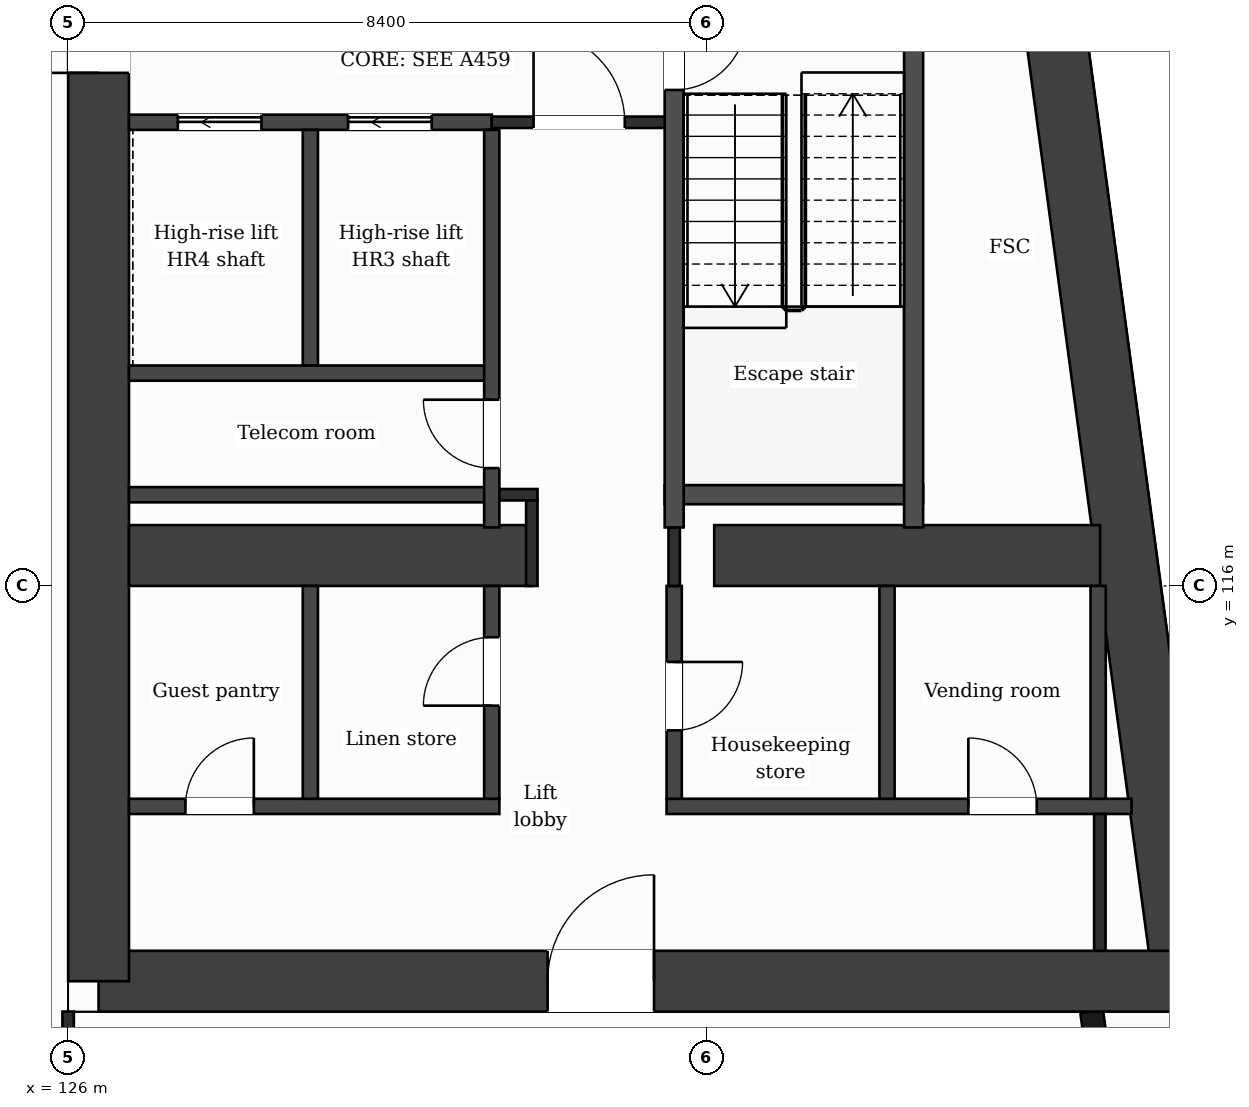
"""IFC4 building model, lengths in metres.
Left out: names, types, materials, properties, quantities, classifications, styles, units other than length and angle.
Written with IfcOpenShell. Run it as: python <this file> out.ifc"""

import sys

from ifc_helpers import new_model, si_unit, direction, frame, frame_2d, origin, place, context, subcontext, project, spatial, rectangle, extrude, element, fill, save


model = new_model("IFC4")
c1 = context("Model", 3, precision=1e-05, world=origin(), true_north=direction((0.0, 1.0)))
c2 = subcontext(c1, "Body", "Model", "MODEL_VIEW")
j1 = project(units=[si_unit("LENGTHUNIT", "METRE"), si_unit("PLANEANGLEUNIT", "RADIAN")], contexts=[c1])
p1 = place(None, origin())
s1 = spatial("IfcSite", under=j1, at=p1, CompositionType="ELEMENT")
p2 = place(p1, origin())
s2 = spatial("IfcBuilding", under=s1, at=p2, CompositionType="ELEMENT")
p3 = place(p2, frame((0.0, 0.0, 239.2)))
s3 = spatial("IfcBuildingStorey", under=s2, at=p3, CompositionType="ELEMENT", Elevation=239.2)
p4 = place(p3, frame((137.82, 132.0, 0.0), z_axis=(0.0, 0.0, 1.0), x_axis=(0.133408347329, -0.991061154956, 0.0)))
e1 = element("IfcWall", 1, at=p4, inside=s3, PredefinedType="SHEAR", context=c2, shape_type="SweptSolid", body=[
    extrude(rectangle(XDim=21.391, YDim=0.8, at=frame_2d((10.696, 0.0))), origin(), (0.0, 0.0, 1.0), 3.7),
])
p5 = place(p3, frame((140.673, 110.8, 0.0), z_axis=(0.0, 0.0, 1.0), x_axis=(-1.0, 0.0, 0.0)))
e2 = element("IfcWall", 2, at=p5, inside=s3, PredefinedType="SHEAR", context=c2, shape_type="SweptSolid", body=[
    extrude(rectangle(XDim=14.273, YDim=0.8, at=frame_2d((7.137, 0.0))), origin(), (0.0, 0.0, 1.0), 3.7),
])
p6 = place(p5, frame((6.965, 0.0, 0.0)))
e3 = element("IfcOpeningElement", 3, at=p6, cuts=e2, PredefinedType="OPENING", context=c2, shape_type="SweptSolid", body=[
    extrude(rectangle(XDim=1.4, YDim=2.1, at=frame_2d((0.7, 1.05))), frame((0.0, 0.41, 0.0), z_axis=(0.0, -1.0, 0.0), x_axis=(1.0, 0.0, 0.0)), (0.0, 0.0, 1.0), 0.82),
])
p7 = place(p3, frame((126.4, 110.8, 0.0), z_axis=(0.0, 0.0, 1.0), x_axis=(0.0, 1.0, 0.0)))
e4 = element("IfcWall", 4, at=p7, inside=s3, PredefinedType="SHEAR", context=c2, shape_type="SweptSolid", body=[
    extrude(rectangle(XDim=21.2, YDim=0.8, at=frame_2d((10.6, 0.0))), origin(), (0.0, 0.0, 1.0), 3.7),
])
p8 = place(p7, frame((11.95, 0.0, 0.0)))
e5 = element("IfcOpeningElement", 5, at=p8, cuts=e4, PredefinedType="OPENING", context=c2, shape_type="SweptSolid", body=[
    extrude(rectangle(XDim=1.4, YDim=2.1, at=frame_2d((0.7, 1.05))), frame((0.0, 0.41, 0.0), z_axis=(0.0, -1.0, 0.0), x_axis=(1.0, 0.0, 0.0)), (0.0, 0.0, 1.0), 0.82),
])
p9 = place(p3, frame((126.8, 116.4, 0.0), z_axis=(0.0, 0.0, 1.0), x_axis=(1.0, 0.0, 0.0)))
e6 = element("IfcWall", 6, at=p9, inside=s3, PredefinedType="SHEAR", context=c2, shape_type="SweptSolid", body=[
    extrude(rectangle(XDim=5.3, YDim=0.8, at=frame_2d((2.65, 0.0))), origin(), (0.0, 0.0, 1.0), 3.7),
])
p10 = place(p3, frame((134.5, 116.4, 0.0), z_axis=(0.0, 0.0, 1.0), x_axis=(1.0, 0.0, 0.0)))
e7 = element("IfcWall", 7, at=p10, inside=s3, PredefinedType="SHEAR", context=c2, shape_type="SweptSolid", body=[
    extrude(rectangle(XDim=5.077, YDim=0.8, at=frame_2d((2.539, 0.0))), origin(), (0.0, 0.0, 1.0), 3.7),
])
p11 = place(p3, frame((140.348, 103.85, 0.0), z_axis=(0.0, 0.0, 1.0), x_axis=(-0.133431549479, 0.991058031401, 0.0)))
e8 = element("IfcWall", 8, at=p11, inside=s3, PredefinedType="SOLIDWALL", context=c2, shape_type="SweptSolid", body=[
    extrude(rectangle(XDim=6.609, YDim=0.3, at=frame_2d((3.304, 0.0))), origin(), (0.0, 0.0, 1.0), 3.38),
])
p12 = place(p11, frame((0.737, 0.0, 0.9)))
e9 = element("IfcOpeningElement", 9, at=p12, cuts=e8, PredefinedType="OPENING", context=c2, shape_type="SweptSolid", body=[
    extrude(rectangle(XDim=1.2, YDim=2.1, at=frame_2d((0.6, 1.05))), frame((0.0, 0.16, 0.0), z_axis=(0.0, -1.0, 0.0), x_axis=(1.0, 0.0, 0.0)), (0.0, 0.0, 1.0), 0.32),
])
p13 = place(p11, frame((3.991, 0.0, 0.0)))
e10 = element("IfcOpeningElement", 10, at=p13, cuts=e8, PredefinedType="OPENING", context=c2, shape_type="SweptSolid", body=[
    extrude(rectangle(XDim=1.2, YDim=2.4, at=frame_2d((0.6, 1.2))), frame((0.0, 0.16, 0.0), z_axis=(0.0, -1.0, 0.0), x_axis=(1.0, 0.0, 0.0)), (0.0, 0.0, 1.0), 0.32),
])
p14 = place(p3, frame((126.8, 113.1, 0.0), z_axis=(0.0, 0.0, 1.0), x_axis=(1.0, 0.0, 0.0)))
e11 = element("IfcWall", 11, at=p14, inside=s3, PredefinedType="PARTITIONING", context=c2, shape_type="SweptSolid", body=[
    extrude(rectangle(XDim=4.873, YDim=0.2, at=frame_2d((2.437, 0.0))), origin(), (0.0, 0.0, 1.0), 3.38),
])
p15 = place(p14, frame((0.743, 0.0, 0.0)))
e12 = element("IfcOpeningElement", 12, at=p15, cuts=e11, PredefinedType="OPENING", context=c2, shape_type="SweptSolid", body=[
    extrude(rectangle(XDim=0.9, YDim=2.1, at=frame_2d((0.45, 1.05))), frame((0.0, 0.11, 0.0), z_axis=(0.0, -1.0, 0.0), x_axis=(1.0, 0.0, 0.0)), (0.0, 0.0, 1.0), 0.22),
])
p16 = place(p3, frame((133.873, 113.1, 0.0), z_axis=(0.0, 0.0, 1.0), x_axis=(1.0, 0.0, 0.0)))
e13 = element("IfcWall", 13, at=p16, inside=s3, PredefinedType="PARTITIONING", context=c2, shape_type="SweptSolid", body=[
    extrude(rectangle(XDim=6.117, YDim=0.2, at=frame_2d((3.059, 0.0))), origin(), (0.0, 0.0, 1.0), 3.38),
])
p17 = place(p16, frame((3.97, 0.0, 0.0)))
e14 = element("IfcOpeningElement", 14, at=p17, cuts=e13, PredefinedType="OPENING", context=c2, shape_type="SweptSolid", body=[
    extrude(rectangle(XDim=0.9, YDim=2.1, at=frame_2d((0.45, 1.05))), frame((0.0, 0.11, 0.0), z_axis=(0.0, -1.0, 0.0), x_axis=(1.0, 0.0, 0.0)), (0.0, 0.0, 1.0), 0.22),
])
p18 = place(p3, frame((126.8, 117.2, 0.0), z_axis=(0.0, 0.0, 1.0), x_axis=(1.0, 0.0, 0.0)))
e15 = element("IfcWall", 15, at=p18, inside=s3, PredefinedType="PARTITIONING", context=c2, shape_type="SweptSolid", body=[
    extrude(rectangle(XDim=4.773, YDim=0.2, at=frame_2d((2.386, 0.0))), origin(), (0.0, 0.0, 1.0), 3.38),
])
p19 = place(p3, frame((131.573, 117.2, 0.0), z_axis=(0.0, 0.0, 1.0), x_axis=(1.0, 0.0, 0.0)))
e16 = element("IfcWall", 16, at=p19, inside=s3, PredefinedType="PARTITIONING", context=c2, shape_type="SweptSolid", body=[
    extrude(rectangle(XDim=0.602, YDim=0.15, at=frame_2d((0.301, 0.0))), origin(), (0.0, 0.0, 1.0), 3.38),
])
p20 = place(p3, frame((133.848, 117.2, 0.0), z_axis=(0.0, 0.0, 1.0), x_axis=(1.0, 0.0, 0.0)))
e17 = element("IfcWall", 17, at=p20, inside=s3, PredefinedType="PARTITIONING", context=c2, shape_type="SweptSolid", body=[
    extrude(rectangle(XDim=3.4, YDim=0.25, at=frame_2d((1.7, 0.0))), origin(), (0.0, 0.0, 1.0), 3.38),
])
p21 = place(p3, frame((126.8, 118.8, 0.0), z_axis=(0.0, 0.0, 1.0), x_axis=(1.0, 0.0, 0.0)))
e18 = element("IfcWall", 18, at=p21, inside=s3, PredefinedType="PARTITIONING", context=c2, shape_type="SweptSolid", body=[
    extrude(rectangle(XDim=4.773, YDim=0.2, at=frame_2d((2.386, 0.0))), origin(), (0.0, 0.0, 1.0), 3.38),
])
p22 = place(p3, frame((126.8, 122.1, 0.0), z_axis=(0.0, 0.0, 1.0), x_axis=(1.0, 0.0, 0.0)))
e19 = element("IfcWall", 19, at=p22, inside=s3, PredefinedType="PARTITIONING", context=c2, shape_type="SweptSolid", body=[
    extrude(rectangle(XDim=4.773, YDim=0.2, at=frame_2d((2.386, 0.0))), origin(), (0.0, 0.0, 1.0), 3.38),
])
p23 = place(p22, frame((2.883, 0.0, 0.0)))
e20 = element("IfcOpeningElement", 20, at=p23, cuts=e19, PredefinedType="OPENING", context=c2, shape_type="SweptSolid", body=[
    extrude(rectangle(XDim=1.1, YDim=2.1, at=frame_2d((0.55, 1.05))), frame((0.0, 0.11, 0.0), z_axis=(0.0, -1.0, 0.0), x_axis=(1.0, 0.0, 0.0)), (0.0, 0.0, 1.0), 0.22),
])
p24 = place(p22, frame((0.643, 0.0, 0.0)))
e21 = element("IfcOpeningElement", 21, at=p24, cuts=e19, PredefinedType="OPENING", context=c2, shape_type="SweptSolid", body=[
    extrude(rectangle(XDim=1.1, YDim=2.1, at=frame_2d((0.55, 1.05))), frame((0.0, 0.11, 0.0), z_axis=(0.0, -1.0, 0.0), x_axis=(1.0, 0.0, 0.0)), (0.0, 0.0, 1.0), 0.22),
])
p25 = place(p3, frame((131.573, 122.1, 0.0), z_axis=(0.0, 0.0, 1.0), x_axis=(1.0, 0.0, 0.0)))
e22 = element("IfcWall", 22, at=p25, inside=s3, PredefinedType="PARTITIONING", context=c2, shape_type="SweptSolid", body=[
    extrude(rectangle(XDim=2.4, YDim=0.15, at=frame_2d((1.2, 0.0))), origin(), (0.0, 0.0, 1.0), 3.38),
])
p26 = place(p25, frame((0.55, 0.0, 0.0)))
e23 = element("IfcOpeningElement", 23, at=p26, cuts=e22, PredefinedType="OPENING", context=c2, shape_type="SweptSolid", body=[
    extrude(rectangle(XDim=1.2, YDim=2.1, at=frame_2d((0.6, 1.05))), frame((0.0, 0.085, 0.0), z_axis=(0.0, -1.0, 0.0), x_axis=(1.0, 0.0, 0.0)), (0.0, 0.0, 1.0), 0.17),
])
p27 = place(p3, frame((126.0, 109.075, 0.0), z_axis=(0.0, 0.0, 1.0), x_axis=(0.0, 1.0, 0.0)))
e24 = element("IfcWall", 24, at=p27, inside=s3, PredefinedType="PARTITIONING", context=c2, shape_type="SweptSolid", body=[
    extrude(rectangle(XDim=1.325, YDim=0.15, at=frame_2d((0.663, 0.0))), origin(), (0.0, 0.0, 1.0), 3.38),
])
p28 = place(p3, frame((129.187, 113.2, 0.0), z_axis=(0.0, 0.0, 1.0), x_axis=(0.0, 1.0, 0.0)))
e25 = element("IfcWall", 25, at=p28, inside=s3, PredefinedType="PARTITIONING", context=c2, shape_type="SweptSolid", body=[
    extrude(rectangle(XDim=2.8, YDim=0.2, at=frame_2d((1.4, 0.0))), origin(), (0.0, 0.0, 1.0), 3.38),
])
p29 = place(p3, frame((129.187, 118.9, 0.0), z_axis=(0.0, 0.0, 1.0), x_axis=(0.0, 1.0, 0.0)))
e26 = element("IfcWall", 26, at=p29, inside=s3, PredefinedType="PARTITIONING", context=c2, shape_type="SweptSolid", body=[
    extrude(rectangle(XDim=3.1, YDim=0.2, at=frame_2d((1.55, 0.0))), origin(), (0.0, 0.0, 1.0), 3.38),
])
p30 = place(p3, frame((131.573, 113.2, 0.0), z_axis=(0.0, 0.0, 1.0), x_axis=(0.0, 1.0, 0.0)))
e27 = element("IfcWall", 27, at=p30, inside=s3, PredefinedType="PARTITIONING", context=c2, shape_type="SweptSolid", body=[
    extrude(rectangle(XDim=2.8, YDim=0.2, at=frame_2d((1.4, 0.0))), origin(), (0.0, 0.0, 1.0), 3.38),
])
p31 = place(p30, frame((1.225, 0.0, 0.0)))
e28 = element("IfcOpeningElement", 28, at=p31, cuts=e27, PredefinedType="OPENING", context=c2, shape_type="SweptSolid", body=[
    extrude(rectangle(XDim=0.9, YDim=2.1, at=frame_2d((0.45, 1.05))), frame((0.0, 0.11, 0.0), z_axis=(0.0, -1.0, 0.0), x_axis=(1.0, 0.0, 0.0)), (0.0, 0.0, 1.0), 0.22),
])
p32 = place(p3, frame((131.573, 116.77, 0.0), z_axis=(0.0, 0.0, 1.0), x_axis=(0.0, 1.0, 0.0)))
e29 = element("IfcWall", 29, at=p32, inside=s3, PredefinedType="PARTITIONING", context=c2, shape_type="SweptSolid", body=[
    extrude(rectangle(XDim=5.23, YDim=0.2, at=frame_2d((2.615, 0.0))), origin(), (0.0, 0.0, 1.0), 3.38),
])
p33 = place(p32, frame((0.78, 0.0, 0.0)))
e30 = element("IfcOpeningElement", 30, at=p33, cuts=e29, PredefinedType="OPENING", context=c2, shape_type="SweptSolid", body=[
    extrude(rectangle(XDim=0.9, YDim=2.1, at=frame_2d((0.45, 1.05))), frame((0.0, 0.11, 0.0), z_axis=(0.0, -1.0, 0.0), x_axis=(1.0, 0.0, 0.0)), (0.0, 0.0, 1.0), 0.22),
])
p34 = place(p3, frame((132.1, 116.0, 0.0), z_axis=(0.0, 0.0, 1.0), x_axis=(0.0, 1.0, 0.0)))
e31 = element("IfcWall", 31, at=p34, inside=s3, PredefinedType="PARTITIONING", context=c2, shape_type="SweptSolid", body=[
    extrude(rectangle(XDim=1.125, YDim=0.15, at=frame_2d((0.562, 0.0))), origin(), (0.0, 0.0, 1.0), 3.38),
])
p35 = place(p3, frame((133.973, 113.2, 0.0), z_axis=(0.0, 0.0, 1.0), x_axis=(0.0, 1.0, 0.0)))
e32 = element("IfcWall", 32, at=p35, inside=s3, PredefinedType="PARTITIONING", context=c2, shape_type="SweptSolid", body=[
    extrude(rectangle(XDim=2.8, YDim=0.2, at=frame_2d((1.4, 0.0))), origin(), (0.0, 0.0, 1.0), 3.38),
])
p36 = place(p35, frame((0.9, 0.0, 0.0)))
e33 = element("IfcOpeningElement", 33, at=p36, cuts=e32, PredefinedType="OPENING", context=c2, shape_type="SweptSolid", body=[
    extrude(rectangle(XDim=0.9, YDim=2.1, at=frame_2d((0.45, 1.05))), frame((0.0, 0.11, 0.0), z_axis=(0.0, -1.0, 0.0), x_axis=(1.0, 0.0, 0.0)), (0.0, 0.0, 1.0), 0.22),
])
p37 = place(p3, frame((133.973, 116.0, 0.0), z_axis=(0.0, 0.0, 1.0), x_axis=(0.0, 1.0, 0.0)))
e34 = element("IfcWall", 34, at=p37, inside=s3, PredefinedType="PARTITIONING", context=c2, shape_type="SweptSolid", body=[
    extrude(rectangle(XDim=0.77, YDim=0.15, at=frame_2d((0.385, 0.0))), origin(), (0.0, 0.0, 1.0), 3.38),
])
p38 = place(p3, frame((133.973, 116.77, 0.0), z_axis=(0.0, 0.0, 1.0), x_axis=(0.0, 1.0, 0.0)))
e35 = element("IfcWall", 35, at=p38, inside=s3, PredefinedType="PARTITIONING", context=c2, shape_type="SweptSolid", body=[
    extrude(rectangle(XDim=7.055, YDim=0.25, at=frame_2d((3.527, 0.0))), origin(), (0.0, 0.0, 1.0), 3.38),
])
p39 = place(p38, frame((5.755, 0.0, 0.0)))
e36 = element("IfcOpeningElement", 36, at=p39, cuts=e35, PredefinedType="OPENING", context=c2, shape_type="SweptSolid", body=[
    extrude(rectangle(XDim=0.95, YDim=2.1, at=frame_2d((0.475, 1.05))), frame((0.0, 0.135, 0.0), z_axis=(0.0, -1.0, 0.0), x_axis=(1.0, 0.0, 0.0)), (0.0, 0.0, 1.0), 0.27),
])
p40 = place(p3, frame((136.773, 113.2, 0.0), z_axis=(0.0, 0.0, 1.0), x_axis=(0.0, 1.0, 0.0)))
e37 = element("IfcWall", 37, at=p40, inside=s3, PredefinedType="PARTITIONING", context=c2, shape_type="SweptSolid", body=[
    extrude(rectangle(XDim=2.8, YDim=0.2, at=frame_2d((1.4, 0.0))), origin(), (0.0, 0.0, 1.0), 3.38),
])
p41 = place(p3, frame((137.123, 116.77, 0.0), z_axis=(0.0, 0.0, 1.0), x_axis=(0.0, 1.0, 0.0)))
e38 = element("IfcWall", 38, at=p41, inside=s3, PredefinedType="PARTITIONING", context=c2, shape_type="SweptSolid", body=[
    extrude(rectangle(XDim=7.055, YDim=0.25, at=frame_2d((3.527, 0.0))), origin(), (0.0, 0.0, 1.0), 3.38),
])
p42 = place(p3, frame((139.551, 113.2, 0.0), z_axis=(0.0, 0.0, 1.0), x_axis=(0.0, 1.0, 0.0)))
e39 = element("IfcWall", 39, at=p42, inside=s3, PredefinedType="PARTITIONING", context=c2, shape_type="SweptSolid", body=[
    extrude(rectangle(XDim=2.8, YDim=0.2, at=frame_2d((1.4, 0.0))), origin(), (0.0, 0.0, 1.0), 3.38),
])
p43 = place(p3, frame((139.573, 111.2, 0.0), z_axis=(0.0, 0.0, 1.0), x_axis=(0.0, 1.0, 0.0)))
e40 = element("IfcWall", 40, at=p43, inside=s3, PredefinedType="PARTITIONING", context=c2, shape_type="SweptSolid", body=[
    extrude(rectangle(XDim=1.8, YDim=0.15, at=frame_2d((0.9, 0.0))), origin(), (0.0, 0.0, 1.0), 3.38),
])
p44 = place(p26, origin())
e41 = element("IfcDoor", 41, at=p44, inside=s3, OperationType="SINGLE_SWING_LEFT", PredefinedType="DOOR", context=c2, shape_type="SweptSolid", body=[
    extrude(rectangle(XDim=1.2, YDim=2.1, at=frame_2d((0.6, 1.05))), frame((0.0, 0.025, 0.0), z_axis=(0.0, -1.0, 0.0), x_axis=(1.0, 0.0, 0.0)), (0.0, 0.0, 1.0), 0.05),
])
fill(e23, e41)
p45 = place(p23, origin())
e42 = element("IfcDoor", 42, at=p45, inside=s3, OperationType="SLIDING_TO_LEFT", PredefinedType="DOOR", context=c2, shape_type="SweptSolid", body=[
    extrude(rectangle(XDim=1.1, YDim=2.1, at=frame_2d((0.55, 1.05))), frame((0.0, 0.025, 0.0), z_axis=(0.0, -1.0, 0.0), x_axis=(1.0, 0.0, 0.0)), (0.0, 0.0, 1.0), 0.05),
])
fill(e20, e42)
p46 = place(p24, origin())
e43 = element("IfcDoor", 43, at=p46, inside=s3, OperationType="SLIDING_TO_LEFT", PredefinedType="DOOR", context=c2, shape_type="SweptSolid", body=[
    extrude(rectangle(XDim=1.1, YDim=2.1, at=frame_2d((0.55, 1.05))), frame((0.0, 0.025, 0.0), z_axis=(0.0, -1.0, 0.0), x_axis=(1.0, 0.0, 0.0)), (0.0, 0.0, 1.0), 0.05),
])
fill(e21, e43)
p47 = place(p39, origin())
e44 = element("IfcDoor", 44, at=p47, inside=s3, OperationType="SINGLE_SWING_RIGHT", PredefinedType="DOOR", context=c2, shape_type="SweptSolid", body=[
    extrude(rectangle(XDim=0.95, YDim=2.1, at=frame_2d((0.475, 1.05))), frame((0.0, 0.025, 0.0), z_axis=(0.0, -1.0, 0.0), x_axis=(1.0, 0.0, 0.0)), (0.0, 0.0, 1.0), 0.05),
])
fill(e36, e44)
p48 = place(p33, origin())
e45 = element("IfcDoor", 45, at=p48, inside=s3, OperationType="SINGLE_SWING_RIGHT", PredefinedType="DOOR", context=c2, shape_type="SweptSolid", body=[
    extrude(rectangle(XDim=0.9, YDim=2.1, at=frame_2d((0.45, 1.05))), frame((0.0, 0.025, 0.0), z_axis=(0.0, -1.0, 0.0), x_axis=(1.0, 0.0, 0.0)), (0.0, 0.0, 1.0), 0.05),
])
fill(e30, e45)
p49 = place(p17, origin())
e46 = element("IfcDoor", 46, at=p49, inside=s3, OperationType="SINGLE_SWING_LEFT", PredefinedType="DOOR", context=c2, shape_type="SweptSolid", body=[
    extrude(rectangle(XDim=0.9, YDim=2.1, at=frame_2d((0.45, 1.05))), frame((0.0, 0.025, 0.0), z_axis=(0.0, -1.0, 0.0), x_axis=(1.0, 0.0, 0.0)), (0.0, 0.0, 1.0), 0.05),
])
fill(e14, e46)
p50 = place(p36, origin())
e47 = element("IfcDoor", 47, at=p50, inside=s3, OperationType="SINGLE_SWING_RIGHT", PredefinedType="DOOR", context=c2, shape_type="SweptSolid", body=[
    extrude(rectangle(XDim=0.9, YDim=2.1, at=frame_2d((0.45, 1.05))), frame((0.0, 0.025, 0.0), z_axis=(0.0, -1.0, 0.0), x_axis=(1.0, 0.0, 0.0)), (0.0, 0.0, 1.0), 0.05),
])
fill(e33, e47)
p51 = place(p31, origin())
e48 = element("IfcDoor", 48, at=p51, inside=s3, OperationType="SINGLE_SWING_LEFT", PredefinedType="DOOR", context=c2, shape_type="SweptSolid", body=[
    extrude(rectangle(XDim=0.9, YDim=2.1, at=frame_2d((0.45, 1.05))), frame((0.0, 0.025, 0.0), z_axis=(0.0, -1.0, 0.0), x_axis=(1.0, 0.0, 0.0)), (0.0, 0.0, 1.0), 0.05),
])
fill(e28, e48)
p52 = place(p15, origin())
e49 = element("IfcDoor", 49, at=p52, inside=s3, OperationType="SINGLE_SWING_RIGHT", PredefinedType="DOOR", context=c2, shape_type="SweptSolid", body=[
    extrude(rectangle(XDim=0.9, YDim=2.1, at=frame_2d((0.45, 1.05))), frame((0.0, 0.025, 0.0), z_axis=(0.0, -1.0, 0.0), x_axis=(1.0, 0.0, 0.0)), (0.0, 0.0, 1.0), 0.05),
])
fill(e12, e49)
p53 = place(p6, origin())
e50 = element("IfcDoor", 50, at=p53, inside=s3, OperationType="SINGLE_SWING_LEFT", PredefinedType="DOOR", context=c2, shape_type="SweptSolid", body=[
    extrude(rectangle(XDim=1.4, YDim=2.1, at=frame_2d((0.7, 1.05))), frame((0.0, 0.025, 0.0), z_axis=(0.0, -1.0, 0.0), x_axis=(1.0, 0.0, 0.0)), (0.0, 0.0, 1.0), 0.05),
])
fill(e3, e50)
p54 = place(p8, origin())
e51 = element("IfcDoor", 51, at=p54, inside=s3, OperationType="SINGLE_SWING_LEFT", PredefinedType="DOOR", context=c2, shape_type="SweptSolid", body=[
    extrude(rectangle(XDim=1.4, YDim=2.1, at=frame_2d((0.7, 1.05))), frame((0.0, 0.025, 0.0), z_axis=(0.0, -1.0, 0.0), x_axis=(1.0, 0.0, 0.0)), (0.0, 0.0, 1.0), 0.05),
])
fill(e5, e51)
save(model, sys.argv[1])
